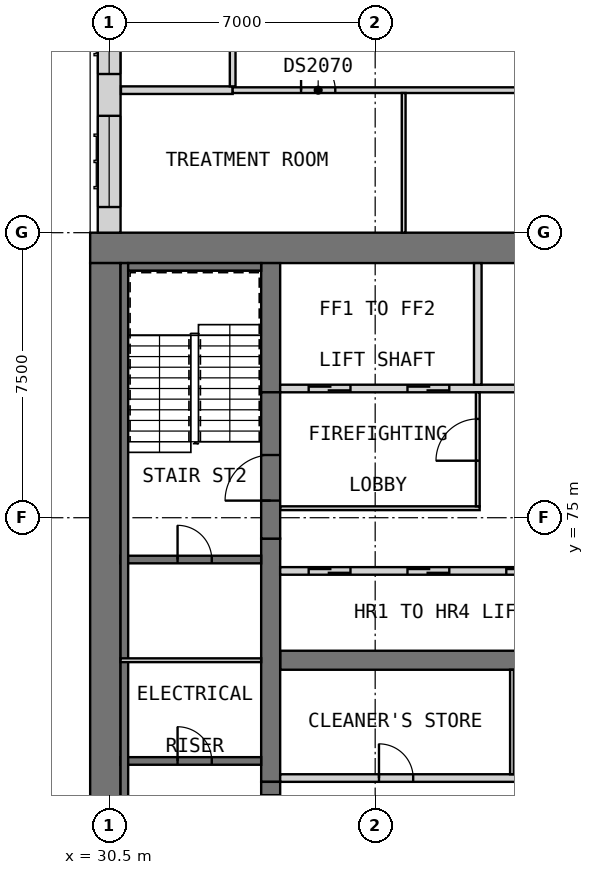
"""IFC4 building model, lengths in metres.
Left out: names, types, materials, properties, quantities, classifications, styles, units other than length and angle.
Written with IfcOpenShell. Run it as: python <this file> out.ifc"""

import sys

from ifc_helpers import new_model, si_unit, direction, frame, frame_2d, origin, place, context, subcontext, project, spatial, rectangle, extrude, element, fill, save


model = new_model("IFC4")
c1 = context("Model", 3, precision=1e-05, world=origin(), true_north=direction((0.0, 1.0)))
c2 = subcontext(c1, "Body", "Model", "MODEL_VIEW")
j1 = project(units=[si_unit("LENGTHUNIT", "METRE"), si_unit("PLANEANGLEUNIT", "RADIAN")], contexts=[c1])
p1 = place(None, origin())
s1 = spatial("IfcSite", under=j1, at=p1, CompositionType="ELEMENT")
p2 = place(p1, origin())
s2 = spatial("IfcBuilding", under=s1, at=p2, CompositionType="ELEMENT")
p3 = place(p2, frame((0.0, 0.0, 133.8)))
s3 = spatial("IfcBuildingStorey", under=s2, at=p3, CompositionType="ELEMENT", Elevation=133.8)
p4 = place(p3, frame((30.0, 82.1, 0.0), z_axis=(0.0, 0.0, 1.0), x_axis=(1.0, 0.0, 0.0)))
e1 = element("IfcWall", 1, at=p4, inside=s3, PredefinedType="SHEAR", context=c2, shape_type="SweptSolid", body=[
    extrude(rectangle(XDim=30.0, YDim=0.8, at=frame_2d((15.0, 0.0))), origin(), (0.0, 0.0, 1.0), 3.6),
])
p5 = place(p3, frame((30.4, 60.8, 0.0), z_axis=(0.0, 0.0, 1.0), x_axis=(0.0, 1.0, 0.0)))
e2 = element("IfcWall", 2, at=p5, inside=s3, PredefinedType="SHEAR", context=c2, shape_type="SweptSolid", body=[
    extrude(rectangle(XDim=20.9, YDim=0.8, at=frame_2d((10.45, 0.0))), origin(), (0.0, 0.0, 1.0), 3.6),
])
p6 = place(p3, frame((35.0, 71.25, 0.0), z_axis=(0.0, 0.0, 1.0), x_axis=(1.0, 0.0, 0.0)))
e3 = element("IfcWall", 3, at=p6, inside=s3, PredefinedType="SHEAR", context=c2, shape_type="SweptSolid", body=[
    extrude(rectangle(XDim=15.6, YDim=0.5, at=frame_2d((7.8, 0.0))), origin(), (0.0, 0.0, 1.0), 3.6),
])
p7 = place(p3, frame((34.75, 68.05, 0.0), z_axis=(0.0, 0.0, 1.0), x_axis=(0.0, 1.0, 0.0)))
e4 = element("IfcWall", 4, at=p7, inside=s3, PredefinedType="SHEAR", context=c2, shape_type="SweptSolid", body=[
    extrude(rectangle(XDim=6.4, YDim=0.5, at=frame_2d((3.2, 0.0))), origin(), (0.0, 0.0, 1.0), 3.6),
])
p8 = place(p3, frame((34.75, 78.3, 0.0), z_axis=(0.0, 0.0, 1.0), x_axis=(0.0, 1.0, 0.0)))
e5 = element("IfcWall", 5, at=p8, inside=s3, PredefinedType="SHEAR", context=c2, shape_type="SweptSolid", body=[
    extrude(rectangle(XDim=3.4, YDim=0.5, at=frame_2d((1.7, 0.0))), origin(), (0.0, 0.0, 1.0), 3.6),
])
p9 = place(p2, frame((0.0, 0.0, 34.0)))
s4 = spatial("IfcBuildingStorey", under=s2, at=p9, CompositionType="ELEMENT", Elevation=34.0)
for number, where, z_axis, x_axis in (
    (6, (29.7, 70.8, 0.0), (0.0, 0.0, 1.0), (0.0, 1.0, 0.0)),
    (7, (29.7, 75.675, 0.0), (0.0, 0.0, 1.0), (0.0, 1.0, 0.0)),
    (8, (29.7, 80.55, 0.0), (0.0, 0.0, 1.0), (0.0, 1.0, 0.0)),
):
    element("IfcWall", number, at=place(p9, frame(where, z_axis=z_axis, x_axis=x_axis)), inside=s4, PredefinedType="SOLIDWALL", context=c2, shape_type="SweptSolid", body=[
        extrude(rectangle(XDim=0.9, YDim=0.6, at=frame_2d((0.45, 0.0))), origin(), (0.0, 0.0, 1.0), 286.2),
    ])
p10 = place(p3, frame((30.5, 89.5, 0.0), z_axis=(0.0, 0.0, 1.0), x_axis=(0.0, -1.0, 0.0)))
e9 = element("IfcWall", 9, at=p10, inside=s3, PredefinedType="SOLIDWALL", context=c2, shape_type="SweptSolid", body=[
    extrude(rectangle(XDim=7.0, YDim=0.6, at=frame_2d((3.5, 0.0))), origin(), (0.0, 0.0, 1.0), 3.35),
])
p11 = place(p10, frame((3.925, 0.0, 0.8)))
e10 = element("IfcOpeningElement", 10, at=p11, cuts=e9, PredefinedType="OPENING", context=c2, shape_type="SweptSolid", body=[
    extrude(rectangle(XDim=2.4, YDim=1.8, at=frame_2d((1.2, 0.9))), frame((0.0, 0.31, 0.0), z_axis=(0.0, -1.0, 0.0), x_axis=(1.0, 0.0, 0.0)), (0.0, 0.0, 1.0), 0.62),
])
p12 = place(p10, frame((0.425, 0.0, 0.8)))
e11 = element("IfcOpeningElement", 11, at=p12, cuts=e9, PredefinedType="OPENING", context=c2, shape_type="SweptSolid", body=[
    extrude(rectangle(XDim=2.4, YDim=1.8, at=frame_2d((1.2, 0.9))), frame((0.0, 0.31, 0.0), z_axis=(0.0, -1.0, 0.0), x_axis=(1.0, 0.0, 0.0)), (0.0, 0.0, 1.0), 0.62),
])
p13 = place(p3, frame((35.0, 68.15, 0.0), z_axis=(0.0, 0.0, 1.0), x_axis=(1.0, 0.0, 0.0)))
e12 = element("IfcWall", 12, at=p13, inside=s3, PredefinedType="PARTITIONING", context=c2, shape_type="SweptSolid", body=[
    extrude(rectangle(XDim=15.6, YDim=0.2, at=frame_2d((7.8, 0.0))), origin(), (0.0, 0.0, 1.0), 3.35),
])
p14 = place(p13, frame((2.6, 0.0, 0.0)))
e13 = element("IfcOpeningElement", 13, at=p14, cuts=e12, PredefinedType="OPENING", context=c2, shape_type="SweptSolid", body=[
    extrude(rectangle(XDim=0.9, YDim=2.1, at=frame_2d((0.45, 1.05))), frame((0.0, 0.11, 0.0), z_axis=(0.0, -1.0, 0.0), x_axis=(1.0, 0.0, 0.0)), (0.0, 0.0, 1.0), 0.22),
])
p15 = place(p13, frame((10.4, 0.0, 0.0)))
e14 = element("IfcOpeningElement", 14, at=p15, cuts=e12, PredefinedType="OPENING", context=c2, shape_type="SweptSolid", body=[
    extrude(rectangle(XDim=0.9, YDim=2.1, at=frame_2d((0.45, 1.05))), frame((0.0, 0.11, 0.0), z_axis=(0.0, -1.0, 0.0), x_axis=(1.0, 0.0, 0.0)), (0.0, 0.0, 1.0), 0.22),
])
p16 = place(p3, frame((41.1, 68.25, 0.0), z_axis=(0.0, 0.0, 1.0), x_axis=(0.0, 1.0, 0.0)))
e15 = element("IfcWall", 15, at=p16, inside=s3, PredefinedType="PARTITIONING", context=c2, shape_type="SweptSolid", body=[
    extrude(rectangle(XDim=2.75, YDim=0.1, at=frame_2d((1.375, 0.0))), origin(), (0.0, 0.0, 1.0), 3.35),
])
p17 = place(p3, frame((35.0, 73.6, 0.0), z_axis=(0.0, 0.0, 1.0), x_axis=(1.0, 0.0, 0.0)))
e16 = element("IfcWall", 16, at=p17, inside=s3, PredefinedType="SOLIDWALL", context=c2, shape_type="SweptSolid", body=[
    extrude(rectangle(XDim=15.6, YDim=0.2, at=frame_2d((7.8, 0.0))), origin(), (0.0, 0.0, 1.0), 3.6),
])
p18 = place(p17, frame((0.75, 0.0, 0.0)))
e17 = element("IfcOpeningElement", 17, at=p18, cuts=e16, PredefinedType="OPENING", context=c2, shape_type="SweptSolid", body=[
    extrude(rectangle(XDim=1.1, YDim=2.1, at=frame_2d((0.55, 1.05))), frame((0.0, 0.11, 0.0), z_axis=(0.0, -1.0, 0.0), x_axis=(1.0, 0.0, 0.0)), (0.0, 0.0, 1.0), 0.22),
])
p19 = place(p17, frame((3.35, 0.0, 0.0)))
e18 = element("IfcOpeningElement", 18, at=p19, cuts=e16, PredefinedType="OPENING", context=c2, shape_type="SweptSolid", body=[
    extrude(rectangle(XDim=1.1, YDim=2.1, at=frame_2d((0.55, 1.05))), frame((0.0, 0.11, 0.0), z_axis=(0.0, -1.0, 0.0), x_axis=(1.0, 0.0, 0.0)), (0.0, 0.0, 1.0), 0.22),
])
p20 = place(p17, frame((5.95, 0.0, 0.0)))
e19 = element("IfcOpeningElement", 19, at=p20, cuts=e16, PredefinedType="OPENING", context=c2, shape_type="SweptSolid", body=[
    extrude(rectangle(XDim=1.1, YDim=2.1, at=frame_2d((0.55, 1.05))), frame((0.0, 0.11, 0.0), z_axis=(0.0, -1.0, 0.0), x_axis=(1.0, 0.0, 0.0)), (0.0, 0.0, 1.0), 0.22),
])
p21 = place(p17, frame((8.55, 0.0, 0.0)))
e20 = element("IfcOpeningElement", 20, at=p21, cuts=e16, PredefinedType="OPENING", context=c2, shape_type="SweptSolid", body=[
    extrude(rectangle(XDim=1.1, YDim=2.1, at=frame_2d((0.55, 1.05))), frame((0.0, 0.11, 0.0), z_axis=(0.0, -1.0, 0.0), x_axis=(1.0, 0.0, 0.0)), (0.0, 0.0, 1.0), 0.22),
])
p22 = place(p17, frame((11.15, 0.0, 0.0)))
e21 = element("IfcOpeningElement", 21, at=p22, cuts=e16, PredefinedType="OPENING", context=c2, shape_type="SweptSolid", body=[
    extrude(rectangle(XDim=1.1, YDim=2.1, at=frame_2d((0.55, 1.05))), frame((0.0, 0.11, 0.0), z_axis=(0.0, -1.0, 0.0), x_axis=(1.0, 0.0, 0.0)), (0.0, 0.0, 1.0), 0.22),
])
p23 = place(p17, frame((13.75, 0.0, 0.0)))
e22 = element("IfcOpeningElement", 22, at=p23, cuts=e16, PredefinedType="OPENING", context=c2, shape_type="SweptSolid", body=[
    extrude(rectangle(XDim=1.1, YDim=2.1, at=frame_2d((0.55, 1.05))), frame((0.0, 0.11, 0.0), z_axis=(0.0, -1.0, 0.0), x_axis=(1.0, 0.0, 0.0)), (0.0, 0.0, 1.0), 0.22),
])
p24 = place(p3, frame((35.0, 78.4, 0.0), z_axis=(0.0, 0.0, 1.0), x_axis=(1.0, 0.0, 0.0)))
e23 = element("IfcWall", 23, at=p24, inside=s3, PredefinedType="SOLIDWALL", context=c2, shape_type="SweptSolid", body=[
    extrude(rectangle(XDim=15.6, YDim=0.2, at=frame_2d((7.8, 0.0))), origin(), (0.0, 0.0, 1.0), 3.6),
])
p25 = place(p24, frame((0.75, 0.0, 0.0)))
e24 = element("IfcOpeningElement", 24, at=p25, cuts=e23, PredefinedType="OPENING", context=c2, shape_type="SweptSolid", body=[
    extrude(rectangle(XDim=1.1, YDim=2.1, at=frame_2d((0.55, 1.05))), frame((0.0, 0.11, 0.0), z_axis=(0.0, -1.0, 0.0), x_axis=(1.0, 0.0, 0.0)), (0.0, 0.0, 1.0), 0.22),
])
p26 = place(p24, frame((3.35, 0.0, 0.0)))
e25 = element("IfcOpeningElement", 25, at=p26, cuts=e23, PredefinedType="OPENING", context=c2, shape_type="SweptSolid", body=[
    extrude(rectangle(XDim=1.1, YDim=2.1, at=frame_2d((0.55, 1.05))), frame((0.0, 0.11, 0.0), z_axis=(0.0, -1.0, 0.0), x_axis=(1.0, 0.0, 0.0)), (0.0, 0.0, 1.0), 0.22),
])
p27 = place(p24, frame((11.15, 0.0, 0.0)))
e26 = element("IfcOpeningElement", 26, at=p27, cuts=e23, PredefinedType="OPENING", context=c2, shape_type="SweptSolid", body=[
    extrude(rectangle(XDim=1.1, YDim=2.1, at=frame_2d((0.55, 1.05))), frame((0.0, 0.11, 0.0), z_axis=(0.0, -1.0, 0.0), x_axis=(1.0, 0.0, 0.0)), (0.0, 0.0, 1.0), 0.22),
])
p28 = place(p24, frame((13.75, 0.0, 0.0)))
e27 = element("IfcOpeningElement", 27, at=p28, cuts=e23, PredefinedType="OPENING", context=c2, shape_type="SweptSolid", body=[
    extrude(rectangle(XDim=1.1, YDim=2.1, at=frame_2d((0.55, 1.05))), frame((0.0, 0.11, 0.0), z_axis=(0.0, -1.0, 0.0), x_axis=(1.0, 0.0, 0.0)), (0.0, 0.0, 1.0), 0.22),
])
p29 = place(p3, frame((40.2, 78.5, 0.0), z_axis=(0.0, 0.0, 1.0), x_axis=(0.0, 1.0, 0.0)))
e28 = element("IfcWall", 28, at=p29, inside=s3, PredefinedType="SOLIDWALL", context=c2, shape_type="SweptSolid", body=[
    extrude(rectangle(XDim=3.2, YDim=0.2, at=frame_2d((1.6, 0.0))), origin(), (0.0, 0.0, 1.0), 3.6),
])
p30 = place(p3, frame((35.0, 75.25, 0.0), z_axis=(0.0, 0.0, 1.0), x_axis=(1.0, 0.0, 0.0)))
e29 = element("IfcWall", 29, at=p30, inside=s3, PredefinedType="PARTITIONING", context=c2, shape_type="SweptSolid", body=[
    extrude(rectangle(XDim=5.25, YDim=0.1, at=frame_2d((2.625, 0.0))), origin(), (0.0, 0.0, 1.0), 3.35),
])
p31 = place(p3, frame((40.2, 75.3, 0.0), z_axis=(0.0, 0.0, 1.0), x_axis=(0.0, 1.0, 0.0)))
e30 = element("IfcWall", 30, at=p31, inside=s3, PredefinedType="PARTITIONING", context=c2, shape_type="SweptSolid", body=[
    extrude(rectangle(XDim=3.0, YDim=0.1, at=frame_2d((1.5, 0.0))), origin(), (0.0, 0.0, 1.0), 3.35),
])
p32 = place(p31, frame((1.2, 0.0, 0.0)))
e31 = element("IfcOpeningElement", 31, at=p32, cuts=e30, PredefinedType="OPENING", context=c2, shape_type="SweptSolid", body=[
    extrude(rectangle(XDim=1.1, YDim=2.1, at=frame_2d((0.55, 1.05))), frame((0.0, 0.06, 0.0), z_axis=(0.0, -1.0, 0.0), x_axis=(1.0, 0.0, 0.0)), (0.0, 0.0, 1.0), 0.12),
])
p33 = place(p3, frame((34.75, 64.2, 0.0), z_axis=(0.0, 0.0, 1.0), x_axis=(0.0, 1.0, 0.0)))
e32 = element("IfcWall", 32, at=p33, inside=s3, PredefinedType="SOLIDWALL", context=c2, shape_type="SweptSolid", body=[
    extrude(rectangle(XDim=3.85, YDim=0.5, at=frame_2d((1.925, 0.0))), origin(), (0.0, 0.0, 1.0), 2.4),
])
p34 = place(p33, frame((2.3, 0.0, 0.0)))
e33 = element("IfcOpeningElement", 33, at=p34, cuts=e32, PredefinedType="OPENING", context=c2, shape_type="SweptSolid", body=[
    extrude(rectangle(XDim=1.2, YDim=2.1, at=frame_2d((0.6, 1.05))), frame((0.0, 0.26, 0.0), z_axis=(0.0, -1.0, 0.0), x_axis=(1.0, 0.0, 0.0)), (0.0, 0.0, 1.0), 0.52),
])
p35 = place(p3, frame((34.75, 74.45, 0.0), z_axis=(0.0, 0.0, 1.0), x_axis=(0.0, 1.0, 0.0)))
e34 = element("IfcWall", 34, at=p35, inside=s3, PredefinedType="SOLIDWALL", context=c2, shape_type="SweptSolid", body=[
    extrude(rectangle(XDim=3.85, YDim=0.5, at=frame_2d((1.925, 0.0))), origin(), (0.0, 0.0, 1.0), 2.4),
])
p36 = place(p35, frame((1.0, 0.0, 0.0)))
e35 = element("IfcOpeningElement", 35, at=p36, cuts=e34, PredefinedType="OPENING", context=c2, shape_type="SweptSolid", body=[
    extrude(rectangle(XDim=1.2, YDim=2.1, at=frame_2d((0.6, 1.05))), frame((0.0, 0.26, 0.0), z_axis=(0.0, -1.0, 0.0), x_axis=(1.0, 0.0, 0.0)), (0.0, 0.0, 1.0), 0.52),
])
p37 = place(p3, frame((30.8, 68.6, 0.0), z_axis=(0.0, 0.0, 1.0), x_axis=(1.0, 0.0, 0.0)))
e36 = element("IfcWall", 36, at=p37, inside=s3, PredefinedType="SOLIDWALL", context=c2, shape_type="SweptSolid", body=[
    extrude(rectangle(XDim=3.7, YDim=0.2, at=frame_2d((1.85, 0.0))), origin(), (0.0, 0.0, 1.0), 3.35),
])
p38 = place(p37, frame((1.5, 0.0, 0.0)))
e37 = element("IfcOpeningElement", 37, at=p38, cuts=e36, PredefinedType="OPENING", context=c2, shape_type="SweptSolid", body=[
    extrude(rectangle(XDim=0.9, YDim=2.1, at=frame_2d((0.45, 1.05))), frame((0.0, 0.11, 0.0), z_axis=(0.0, -1.0, 0.0), x_axis=(1.0, 0.0, 0.0)), (0.0, 0.0, 1.0), 0.22),
])
p39 = place(p3, frame((30.8, 73.9, 0.0), z_axis=(0.0, 0.0, 1.0), x_axis=(1.0, 0.0, 0.0)))
e38 = element("IfcWall", 38, at=p39, inside=s3, PredefinedType="SOLIDWALL", context=c2, shape_type="SweptSolid", body=[
    extrude(rectangle(XDim=3.7, YDim=0.2, at=frame_2d((1.85, 0.0))), origin(), (0.0, 0.0, 1.0), 3.35),
])
p40 = place(p39, frame((1.5, 0.0, 0.0)))
e39 = element("IfcOpeningElement", 39, at=p40, cuts=e38, PredefinedType="OPENING", context=c2, shape_type="SweptSolid", body=[
    extrude(rectangle(XDim=0.9, YDim=2.1, at=frame_2d((0.45, 1.05))), frame((0.0, 0.11, 0.0), z_axis=(0.0, -1.0, 0.0), x_axis=(1.0, 0.0, 0.0)), (0.0, 0.0, 1.0), 0.22),
])
p41 = place(p3, frame((30.9, 60.8, 0.0), z_axis=(0.0, 0.0, 1.0), x_axis=(0.0, 1.0, 0.0)))
e40 = element("IfcWall", 40, at=p41, inside=s3, PredefinedType="SOLIDWALL", context=c2, shape_type="SweptSolid", body=[
    extrude(rectangle(XDim=20.9, YDim=0.2, at=frame_2d((10.45, 0.0))), origin(), (0.0, 0.0, 1.0), 3.35),
])
p42 = place(p3, frame((31.0, 81.6, 0.0), z_axis=(0.0, 0.0, 1.0), x_axis=(1.0, 0.0, 0.0)))
e41 = element("IfcWall", 41, at=p42, inside=s3, PredefinedType="SOLIDWALL", context=c2, shape_type="SweptSolid", body=[
    extrude(rectangle(XDim=3.5, YDim=0.2, at=frame_2d((1.75, 0.0))), origin(), (0.0, 0.0, 1.0), 3.35),
])
p43 = place(p3, frame((30.8, 71.25, 0.0), z_axis=(0.0, 0.0, 1.0), x_axis=(1.0, 0.0, 0.0)))
e42 = element("IfcWall", 42, at=p43, inside=s3, PredefinedType="PARTITIONING", context=c2, shape_type="SweptSolid", body=[
    extrude(rectangle(XDim=3.7, YDim=0.1, at=frame_2d((1.85, 0.0))), origin(), (0.0, 0.0, 1.0), 3.35),
])
p44 = place(p3, frame((30.81, 86.25, 0.0), z_axis=(0.0, 0.0, 1.0), x_axis=(1.0, 0.0, 0.0)))
e43 = element("IfcWall", 43, at=p44, inside=s3, PredefinedType="PARTITIONING", context=c2, shape_type="SweptSolid", body=[
    extrude(rectangle(XDim=2.94, YDim=0.2, at=frame_2d((1.47, 0.0))), origin(), (0.0, 0.0, 1.0), 3.35),
])
p45 = place(p3, frame((33.75, 86.25, 0.0), z_axis=(0.0, 0.0, 1.0), x_axis=(1.0, 0.0, 0.0)))
e44 = element("IfcWall", 44, at=p45, inside=s3, PredefinedType="PARTITIONING", context=c2, shape_type="SweptSolid", body=[
    extrude(rectangle(XDim=37.5, YDim=0.15, at=frame_2d((18.75, 0.0))), origin(), (0.0, 0.0, 1.0), 3.35),
])
p46 = place(p45, frame((1.8, 0.0, 0.0)))
e45 = element("IfcOpeningElement", 45, at=p46, cuts=e44, PredefinedType="OPENING", context=c2, shape_type="SweptSolid", body=[
    extrude(rectangle(XDim=0.9, YDim=2.1, at=frame_2d((0.45, 1.05))), frame((0.0, 0.085, 0.0), z_axis=(0.0, -1.0, 0.0), x_axis=(1.0, 0.0, 0.0)), (0.0, 0.0, 1.0), 0.17),
])
p47 = place(p3, frame((33.75, 86.35, 0.0), z_axis=(0.0, 0.0, 1.0), x_axis=(0.0, 1.0, 0.0)))
e46 = element("IfcWall", 46, at=p47, inside=s3, PredefinedType="PARTITIONING", context=c2, shape_type="SweptSolid", body=[
    extrude(rectangle(XDim=2.225, YDim=0.15, at=frame_2d((1.112, 0.0))), origin(), (0.0, 0.0, 1.0), 3.35),
])
p48 = place(p3, frame((38.25, 82.5, 0.0), z_axis=(0.0, 0.0, 1.0), x_axis=(0.0, 1.0, 0.0)))
e47 = element("IfcWall", 47, at=p48, inside=s3, PredefinedType="PARTITIONING", context=c2, shape_type="SweptSolid", body=[
    extrude(rectangle(XDim=3.675, YDim=0.1, at=frame_2d((1.837, 0.0))), origin(), (0.0, 0.0, 1.0), 3.35),
])
p49 = place(p11, origin())
e48 = element("IfcWindow", 48, at=p49, inside=s3, PartitioningType="SINGLE_PANEL", PredefinedType="WINDOW", context=c2, shape_type="SweptSolid", body=[
    extrude(rectangle(XDim=2.4, YDim=1.8, at=frame_2d((1.2, 0.9))), frame((0.0, -0.07, 0.0), z_axis=(0.0, -1.0, 0.0), x_axis=(1.0, 0.0, 0.0)), (0.0, 0.0, 1.0), 0.06),
])
fill(e10, e48)
p50 = place(p12, origin())
e49 = element("IfcWindow", 49, at=p50, inside=s3, PartitioningType="SINGLE_PANEL", PredefinedType="WINDOW", context=c2, shape_type="SweptSolid", body=[
    extrude(rectangle(XDim=2.4, YDim=1.8, at=frame_2d((1.2, 0.9))), frame((0.0, -0.07, 0.0), z_axis=(0.0, -1.0, 0.0), x_axis=(1.0, 0.0, 0.0)), (0.0, 0.0, 1.0), 0.06),
])
fill(e11, e49)
p51 = place(p14, origin())
e50 = element("IfcDoor", 50, at=p51, inside=s3, OperationType="SINGLE_SWING_RIGHT", PredefinedType="DOOR", context=c2, shape_type="SweptSolid", body=[
    extrude(rectangle(XDim=0.9, YDim=2.1, at=frame_2d((0.45, 1.05))), frame((0.0, 0.025, 0.0), z_axis=(0.0, -1.0, 0.0), x_axis=(1.0, 0.0, 0.0)), (0.0, 0.0, 1.0), 0.05),
])
fill(e13, e50)
p52 = place(p18, origin())
e51 = element("IfcDoor", 51, at=p52, inside=s3, OperationType="DOUBLE_DOOR_SLIDING", PredefinedType="DOOR", context=c2, shape_type="SweptSolid", body=[
    extrude(rectangle(XDim=1.1, YDim=2.1, at=frame_2d((0.55, 1.05))), frame((0.0, 0.025, 0.0), z_axis=(0.0, -1.0, 0.0), x_axis=(1.0, 0.0, 0.0)), (0.0, 0.0, 1.0), 0.05),
])
fill(e17, e51)
p53 = place(p19, origin())
e52 = element("IfcDoor", 52, at=p53, inside=s3, OperationType="DOUBLE_DOOR_SLIDING", PredefinedType="DOOR", context=c2, shape_type="SweptSolid", body=[
    extrude(rectangle(XDim=1.1, YDim=2.1, at=frame_2d((0.55, 1.05))), frame((0.0, 0.025, 0.0), z_axis=(0.0, -1.0, 0.0), x_axis=(1.0, 0.0, 0.0)), (0.0, 0.0, 1.0), 0.05),
])
fill(e18, e52)
p54 = place(p20, origin())
e53 = element("IfcDoor", 53, at=p54, inside=s3, OperationType="DOUBLE_DOOR_SLIDING", PredefinedType="DOOR", context=c2, shape_type="SweptSolid", body=[
    extrude(rectangle(XDim=1.1, YDim=2.1, at=frame_2d((0.55, 1.05))), frame((0.0, 0.025, 0.0), z_axis=(0.0, -1.0, 0.0), x_axis=(1.0, 0.0, 0.0)), (0.0, 0.0, 1.0), 0.05),
])
fill(e19, e53)
p55 = place(p25, origin())
e54 = element("IfcDoor", 54, at=p55, inside=s3, OperationType="DOUBLE_DOOR_SLIDING", PredefinedType="DOOR", context=c2, shape_type="SweptSolid", body=[
    extrude(rectangle(XDim=1.1, YDim=2.1, at=frame_2d((0.55, 1.05))), frame((0.0, 0.025, 0.0), z_axis=(0.0, -1.0, 0.0), x_axis=(1.0, 0.0, 0.0)), (0.0, 0.0, 1.0), 0.05),
])
fill(e24, e54)
p56 = place(p26, origin())
e55 = element("IfcDoor", 55, at=p56, inside=s3, OperationType="DOUBLE_DOOR_SLIDING", PredefinedType="DOOR", context=c2, shape_type="SweptSolid", body=[
    extrude(rectangle(XDim=1.1, YDim=2.1, at=frame_2d((0.55, 1.05))), frame((0.0, 0.025, 0.0), z_axis=(0.0, -1.0, 0.0), x_axis=(1.0, 0.0, 0.0)), (0.0, 0.0, 1.0), 0.05),
])
fill(e25, e55)
p57 = place(p32, origin())
e56 = element("IfcDoor", 56, at=p57, inside=s3, OperationType="SINGLE_SWING_LEFT", PredefinedType="DOOR", context=c2, shape_type="SweptSolid", body=[
    extrude(rectangle(XDim=1.1, YDim=2.1, at=frame_2d((0.55, 1.05))), frame((0.0, 0.025, 0.0), z_axis=(0.0, -1.0, 0.0), x_axis=(1.0, 0.0, 0.0)), (0.0, 0.0, 1.0), 0.05),
])
fill(e31, e56)
p58 = place(p34, origin())
e57 = element("IfcDoor", 57, at=p58, inside=s3, OperationType="SINGLE_SWING_LEFT", PredefinedType="DOOR", context=c2, shape_type="SweptSolid", body=[
    extrude(rectangle(XDim=1.2, YDim=2.1, at=frame_2d((0.6, 1.05))), frame((0.0, 0.025, 0.0), z_axis=(0.0, -1.0, 0.0), x_axis=(1.0, 0.0, 0.0)), (0.0, 0.0, 1.0), 0.05),
])
fill(e33, e57)
p59 = place(p36, origin())
e58 = element("IfcDoor", 58, at=p59, inside=s3, OperationType="SINGLE_SWING_RIGHT", PredefinedType="DOOR", context=c2, shape_type="SweptSolid", body=[
    extrude(rectangle(XDim=1.2, YDim=2.1, at=frame_2d((0.6, 1.05))), frame((0.0, 0.025, 0.0), z_axis=(0.0, -1.0, 0.0), x_axis=(1.0, 0.0, 0.0)), (0.0, 0.0, 1.0), 0.05),
])
fill(e35, e58)
p60 = place(p38, origin())
e59 = element("IfcDoor", 59, at=p60, inside=s3, OperationType="SINGLE_SWING_LEFT", PredefinedType="DOOR", context=c2, shape_type="SweptSolid", body=[
    extrude(rectangle(XDim=0.9, YDim=2.1, at=frame_2d((0.45, 1.05))), frame((0.0, 0.025, 0.0), z_axis=(0.0, -1.0, 0.0), x_axis=(1.0, 0.0, 0.0)), (0.0, 0.0, 1.0), 0.05),
])
fill(e37, e59)
p61 = place(p40, origin())
e60 = element("IfcDoor", 60, at=p61, inside=s3, OperationType="SINGLE_SWING_RIGHT", PredefinedType="DOOR", context=c2, shape_type="SweptSolid", body=[
    extrude(rectangle(XDim=0.9, YDim=2.1, at=frame_2d((0.45, 1.05))), frame((0.0, 0.025, 0.0), z_axis=(0.0, -1.0, 0.0), x_axis=(1.0, 0.0, 0.0)), (0.0, 0.0, 1.0), 0.05),
])
fill(e39, e60)
p62 = place(p46, origin())
e61 = element("IfcDoor", 61, at=p62, inside=s3, OperationType="SINGLE_SWING_RIGHT", PredefinedType="DOOR", context=c2, shape_type="SweptSolid", body=[
    extrude(rectangle(XDim=0.9, YDim=2.1, at=frame_2d((0.45, 1.05))), frame((0.0, 0.025, 0.0), z_axis=(0.0, -1.0, 0.0), x_axis=(1.0, 0.0, 0.0)), (0.0, 0.0, 1.0), 0.05),
])
fill(e45, e61)
save(model, sys.argv[1])
